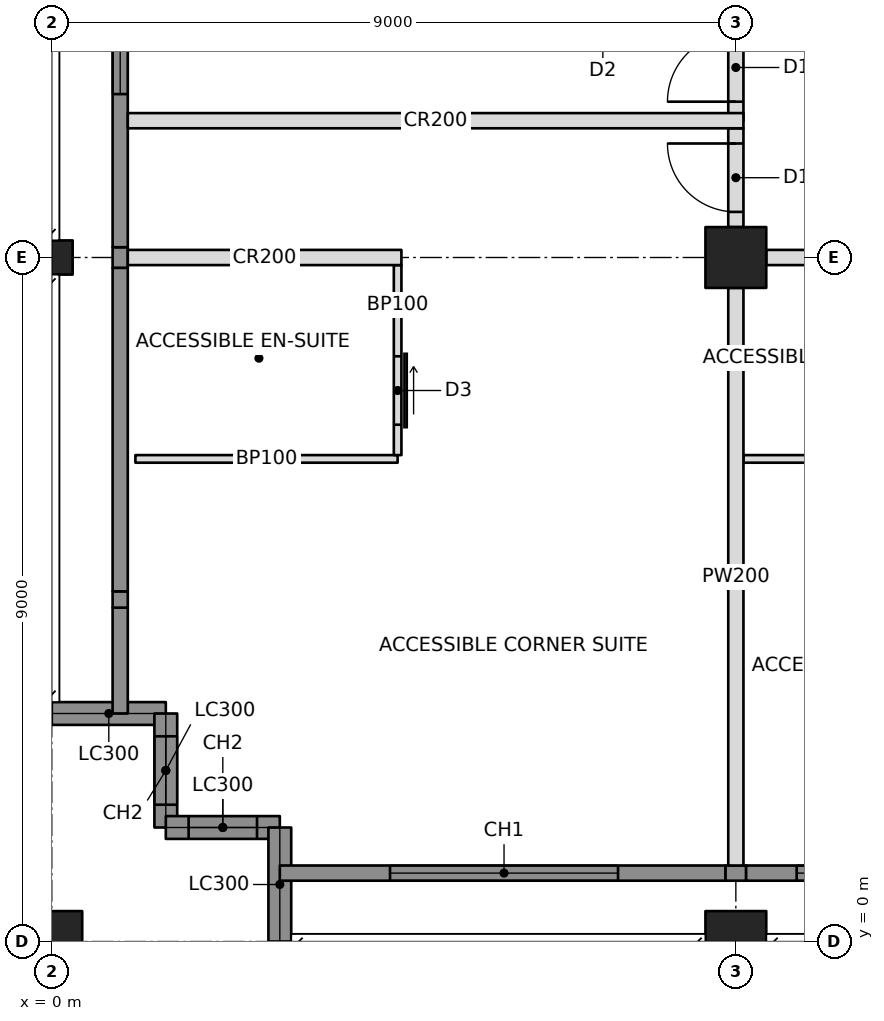
"""IFC4 building model, lengths in metres.
Left out: names, types, materials, properties, quantities, classifications, styles, units other than length and angle.
Written with IfcOpenShell. Run it as: python <this file> out.ifc"""

import sys

from ifc_helpers import new_model, si_unit, direction, frame, frame_2d, origin, origin_with_axes, origin_2d, place, context, subcontext, project, spatial, rectangle, hollow_rectangle, i_section, extrude, element, fill, save


model = new_model("IFC4")
c1 = context("Model", 3, precision=1e-05, world=origin(), true_north=direction((0.0, 1.0)))
c2 = subcontext(c1, "Body", "Model", "MODEL_VIEW")
j1 = project(units=[si_unit("LENGTHUNIT", "METRE"), si_unit("PLANEANGLEUNIT", "RADIAN")], contexts=[c1])
p1 = place(None, origin())
s1 = spatial("IfcSite", under=j1, at=p1, CompositionType="ELEMENT")
p2 = place(p1, origin())
s2 = spatial("IfcBuilding", under=s1, at=p2, CompositionType="ELEMENT")
p3 = place(p2, frame((0.0, 0.0, 170.6)))
s3 = spatial("IfcBuildingStorey", under=s2, at=p3, CompositionType="ELEMENT", Elevation=170.6)
p4 = place(p3, origin_with_axes())
e1 = element("IfcColumn", 1, at=p4, inside=s3, PredefinedType="COLUMN", context=c2, shape_type="SweptSolid", body=[
    extrude(hollow_rectangle(XDim=0.8, YDim=0.8, WallThickness=0.07, at=origin_2d()), origin(), (0.0, 0.0, 1.0), 3.4),
])
p5 = place(p3, frame((0.0, 9.0, 0.0), z_axis=(0.0, 0.0, 1.0), x_axis=(0.0, 1.0, 0.0)))
e2 = element("IfcColumn", 2, at=p5, inside=s3, PredefinedType="COLUMN", context=c2, shape_type="SweptSolid", body=[
    extrude(i_section(OverallWidth=0.449, OverallDepth=0.549, WebThickness=0.072, FlangeThickness=0.115, at=origin_2d()), origin(), (0.0, 0.0, 1.0), 3.4),
])
p6 = place(p3, frame((9.0, 0.0, 0.0), z_axis=(0.0, 0.0, 1.0), x_axis=(1.0, 0.0, 0.0)))
e3 = element("IfcColumn", 3, at=p6, inside=s3, PredefinedType="COLUMN", context=c2, shape_type="SweptSolid", body=[
    extrude(hollow_rectangle(XDim=0.8, YDim=0.8, WallThickness=0.07, at=origin_2d()), origin(), (0.0, 0.0, 1.0), 3.4),
])
p7 = place(p3, frame((9.0, 9.0, 0.0), z_axis=(0.0, 0.0, 1.0), x_axis=(1.0, 0.0, 0.0)))
e4 = element("IfcColumn", 4, at=p7, inside=s3, PredefinedType="COLUMN", context=c2, shape_type="SweptSolid", body=[
    extrude(hollow_rectangle(XDim=0.8, YDim=0.8, WallThickness=0.06, at=origin_2d()), origin(), (0.0, 0.0, 1.0), 3.4),
])
p8 = place(p3, frame((0.0, 3.0, 0.0), z_axis=(0.0, 0.0, 1.0), x_axis=(1.0, 0.0, 0.0)))
e5 = element("IfcWall", 5, at=p8, inside=s3, PredefinedType="SOLIDWALL", context=c2, shape_type="SweptSolid", body=[
    extrude(rectangle(XDim=1.5, YDim=0.3, at=frame_2d((0.75, 0.0))), origin(), (0.0, 0.0, 1.0), 2.42),
])
p9 = place(p3, frame((1.5, 3.0, 0.0), z_axis=(0.0, 0.0, 1.0), x_axis=(0.0, -1.0, 0.0)))
e6 = element("IfcWall", 6, at=p9, inside=s3, PredefinedType="SOLIDWALL", context=c2, shape_type="SweptSolid", body=[
    extrude(rectangle(XDim=1.5, YDim=0.3, at=frame_2d((0.75, 0.0))), origin(), (0.0, 0.0, 1.0), 3.2),
])
p10 = place(p9, frame((0.3, 0.0, 0.6)))
e7 = element("IfcOpeningElement", 7, at=p10, cuts=e6, PredefinedType="OPENING", context=c2, shape_type="SweptSolid", body=[
    extrude(rectangle(XDim=0.9, YDim=2.2, at=frame_2d((0.45, 1.1))), frame((0.0, 0.16, 0.0), z_axis=(0.0, -1.0, 0.0), x_axis=(1.0, 0.0, 0.0)), (0.0, 0.0, 1.0), 0.32),
])
p11 = place(p3, frame((1.5, 1.5, 0.0), z_axis=(0.0, 0.0, 1.0), x_axis=(1.0, 0.0, 0.0)))
e8 = element("IfcWall", 8, at=p11, inside=s3, PredefinedType="SOLIDWALL", context=c2, shape_type="SweptSolid", body=[
    extrude(rectangle(XDim=1.5, YDim=0.3, at=frame_2d((0.75, 0.0))), origin(), (0.0, 0.0, 1.0), 3.2),
])
p12 = place(p11, frame((0.3, 0.0, 0.6)))
e9 = element("IfcOpeningElement", 9, at=p12, cuts=e8, PredefinedType="OPENING", context=c2, shape_type="SweptSolid", body=[
    extrude(rectangle(XDim=0.9, YDim=2.2, at=frame_2d((0.45, 1.1))), frame((0.0, 0.16, 0.0), z_axis=(0.0, -1.0, 0.0), x_axis=(1.0, 0.0, 0.0)), (0.0, 0.0, 1.0), 0.32),
])
p13 = place(p3, frame((3.0, 1.5, 0.0), z_axis=(0.0, 0.0, 1.0), x_axis=(0.0, -1.0, 0.0)))
e10 = element("IfcWall", 10, at=p13, inside=s3, PredefinedType="SOLIDWALL", context=c2, shape_type="SweptSolid", body=[
    extrude(rectangle(XDim=1.5, YDim=0.3, at=frame_2d((0.75, 0.0))), origin(), (0.0, 0.0, 1.0), 2.42),
])
p14 = place(p3, frame((3.0, 0.9, 0.0), z_axis=(0.0, 0.0, 1.0), x_axis=(1.0, 0.0, 0.0)))
e11 = element("IfcWall", 11, at=p14, inside=s3, PredefinedType="SOLIDWALL", context=c2, shape_type="SweptSolid", body=[
    extrude(rectangle(XDim=5.865, YDim=0.2, at=frame_2d((2.932, 0.0))), origin(), (0.0, 0.0, 1.0), 3.2),
])
p15 = place(p14, frame((1.45, 0.0, 0.6)))
e12 = element("IfcOpeningElement", 12, at=p15, cuts=e11, PredefinedType="OPENING", context=c2, shape_type="SweptSolid", body=[
    extrude(rectangle(XDim=3.0, YDim=2.2, at=frame_2d((1.5, 1.1))), frame((0.0, 0.11, 0.0), z_axis=(0.0, -1.0, 0.0), x_axis=(1.0, 0.0, 0.0)), (0.0, 0.0, 1.0), 0.22),
])
p16 = place(p3, frame((0.9, 3.0, 0.0), z_axis=(0.0, 0.0, 1.0), x_axis=(0.0, 1.0, 0.0)))
e13 = element("IfcWall", 13, at=p16, inside=s3, PredefinedType="SOLIDWALL", context=c2, shape_type="SweptSolid", body=[
    extrude(rectangle(XDim=1.393, YDim=0.2, at=frame_2d((0.696, 0.0))), origin(), (0.0, 0.0, 1.0), 3.2),
])
p17 = place(p3, frame((1.0, 9.0, 0.0), z_axis=(0.0, 0.0, 1.0), x_axis=(1.0, 0.0, 0.0)))
e14 = element("IfcWall", 14, at=p17, inside=s3, PredefinedType="PARTITIONING", context=c2, shape_type="SweptSolid", body=[
    extrude(rectangle(XDim=3.6, YDim=0.2, at=frame_2d((1.8, 0.0))), origin(), (0.0, 0.0, 1.0), 2.438),
])
p18 = place(p3, frame((9.4, 9.0, 0.0), z_axis=(0.0, 0.0, 1.0), x_axis=(1.0, 0.0, 0.0)))
e15 = element("IfcWall", 15, at=p18, inside=s3, PredefinedType="PARTITIONING", context=c2, shape_type="SweptSolid", body=[
    extrude(rectangle(XDim=8.2, YDim=0.2, at=frame_2d((4.1, 0.0))), origin(), (0.0, 0.0, 1.0), 2.405),
])
p19 = place(p18, frame((2.95, 0.0, 0.0)))
e16 = element("IfcOpeningElement", 16, at=p19, cuts=e15, PredefinedType="OPENING", context=c2, shape_type="SweptSolid", body=[
    extrude(rectangle(XDim=0.9, YDim=2.1, at=frame_2d((0.45, 1.05))), frame((0.0, 0.11, 0.0), z_axis=(0.0, -1.0, 0.0), x_axis=(1.0, 0.0, 0.0)), (0.0, 0.0, 1.0), 0.22),
])
p20 = place(p18, frame((4.35, 0.0, 0.0)))
e17 = element("IfcOpeningElement", 17, at=p20, cuts=e15, PredefinedType="OPENING", context=c2, shape_type="SweptSolid", body=[
    extrude(rectangle(XDim=0.9, YDim=2.1, at=frame_2d((0.45, 1.05))), frame((0.0, 0.11, 0.0), z_axis=(0.0, -1.0, 0.0), x_axis=(1.0, 0.0, 0.0)), (0.0, 0.0, 1.0), 0.22),
])
p21 = place(p3, frame((9.0, 10.8, 0.0), z_axis=(0.0, 0.0, 1.0), x_axis=(0.0, 1.0, 0.0)))
e18 = element("IfcWall", 18, at=p21, inside=s3, PredefinedType="PARTITIONING", context=c2, shape_type="SweptSolid", body=[
    extrude(rectangle(XDim=6.8, YDim=0.2, at=frame_2d((3.4, 0.0))), origin(), (0.0, 0.0, 1.0), 2.405),
])
p22 = place(p21, frame((0.25, 0.0, 0.0)))
e19 = element("IfcOpeningElement", 19, at=p22, cuts=e18, PredefinedType="OPENING", context=c2, shape_type="SweptSolid", body=[
    extrude(rectangle(XDim=0.9, YDim=2.1, at=frame_2d((0.45, 1.05))), frame((0.0, 0.11, 0.0), z_axis=(0.0, -1.0, 0.0), x_axis=(1.0, 0.0, 0.0)), (0.0, 0.0, 1.0), 0.22),
])
p23 = place(p21, frame((3.85, 0.0, 0.0)))
e20 = element("IfcOpeningElement", 20, at=p23, cuts=e18, PredefinedType="OPENING", context=c2, shape_type="SweptSolid", body=[
    extrude(rectangle(XDim=0.9, YDim=2.1, at=frame_2d((0.45, 1.05))), frame((0.0, 0.11, 0.0), z_axis=(0.0, -1.0, 0.0), x_axis=(1.0, 0.0, 0.0)), (0.0, 0.0, 1.0), 0.22),
])
p24 = place(p3, frame((1.0, 10.8, 0.0), z_axis=(0.0, 0.0, 1.0), x_axis=(1.0, 0.0, 0.0)))
e21 = element("IfcWall", 21, at=p24, inside=s3, PredefinedType="PARTITIONING", context=c2, shape_type="SweptSolid", body=[
    extrude(rectangle(XDim=8.1, YDim=0.2, at=frame_2d((4.05, 0.0))), origin(), (0.0, 0.0, 1.0), 2.404),
])
p25 = place(p3, frame((9.0, 8.6, 0.0), z_axis=(0.0, 0.0, 1.0), x_axis=(0.0, -1.0, 0.0)))
e22 = element("IfcWall", 22, at=p25, inside=s3, PredefinedType="PARTITIONING", context=c2, shape_type="SweptSolid", body=[
    extrude(rectangle(XDim=7.6, YDim=0.2, at=frame_2d((3.8, 0.0))), origin(), (0.0, 0.0, 1.0), 2.438),
])
p26 = place(p3, frame((1.1, 6.35, 0.0), z_axis=(0.0, 0.0, 1.0), x_axis=(1.0, 0.0, 0.0)))
e23 = element("IfcWall", 23, at=p26, inside=s3, PredefinedType="PARTITIONING", context=c2, shape_type="SweptSolid", body=[
    extrude(rectangle(XDim=3.45, YDim=0.1, at=frame_2d((1.725, 0.0))), origin(), (0.0, 0.0, 1.0), 3.2),
])
p27 = place(p3, frame((4.55, 8.9, 0.0), z_axis=(0.0, 0.0, 1.0), x_axis=(0.0, -1.0, 0.0)))
e24 = element("IfcWall", 24, at=p27, inside=s3, PredefinedType="PARTITIONING", context=c2, shape_type="SweptSolid", body=[
    extrude(rectangle(XDim=2.5, YDim=0.1, at=frame_2d((1.25, 0.0))), origin(), (0.0, 0.0, 1.0), 2.438),
])
p28 = place(p27, frame((1.2, 0.0, 0.0)))
e25 = element("IfcOpeningElement", 25, at=p28, cuts=e24, PredefinedType="OPENING", context=c2, shape_type="SweptSolid", body=[
    extrude(rectangle(XDim=0.9, YDim=2.1, at=frame_2d((0.45, 1.05))), frame((0.0, 0.06, 0.0), z_axis=(0.0, -1.0, 0.0), x_axis=(1.0, 0.0, 0.0)), (0.0, 0.0, 1.0), 0.12),
])
p29 = place(p3, frame((9.1, 6.35, 0.0), z_axis=(0.0, 0.0, 1.0), x_axis=(1.0, 0.0, 0.0)))
e26 = element("IfcWall", 26, at=p29, inside=s3, PredefinedType="PARTITIONING", context=c2, shape_type="SweptSolid", body=[
    extrude(rectangle(XDim=2.95, YDim=0.1, at=frame_2d((1.475, 0.0))), origin(), (0.0, 0.0, 1.0), 2.438),
])
p30 = place(p3, frame((9.0, 9.4, 0.0), z_axis=(0.0, 0.0, 1.0), x_axis=(0.0, 1.0, 0.0)))
e27 = element("IfcWall", 27, at=p30, inside=s3, PredefinedType="PARTITIONING", context=c2, shape_type="SweptSolid", body=[
    extrude(rectangle(XDim=1.3, YDim=0.2, at=frame_2d((0.65, 0.0))), origin(), (0.0, 0.0, 1.0), 2.405),
])
p31 = place(p30, frame((0.2, 0.0, 0.0)))
e28 = element("IfcOpeningElement", 28, at=p31, cuts=e27, PredefinedType="OPENING", context=c2, shape_type="SweptSolid", body=[
    extrude(rectangle(XDim=0.9, YDim=2.1, at=frame_2d((0.45, 1.05))), frame((0.0, 0.11, 0.0), z_axis=(0.0, -1.0, 0.0), x_axis=(1.0, 0.0, 0.0)), (0.0, 0.0, 1.0), 0.22),
])
p32 = place(p3, frame((8.865, 0.9, 0.0), z_axis=(0.0, 0.0, 1.0), x_axis=(1.0, 0.0, 0.0)))
e29 = element("IfcWall", 29, at=p32, inside=s3, PredefinedType="SOLIDWALL", context=c2, shape_type="SweptSolid", body=[
    extrude(rectangle(XDim=0.271, YDim=0.2, at=frame_2d((0.135, 0.0))), origin(), (0.0, 0.0, 1.0), 2.438),
])
p33 = place(p3, frame((9.135, 0.9, 0.0), z_axis=(0.0, 0.0, 1.0), x_axis=(1.0, 0.0, 0.0)))
e30 = element("IfcWall", 30, at=p33, inside=s3, PredefinedType="SOLIDWALL", context=c2, shape_type="SweptSolid", body=[
    extrude(rectangle(XDim=8.671, YDim=0.2, at=frame_2d((4.335, 0.0))), origin(), (0.0, 0.0, 1.0), 3.2),
])
p34 = place(p33, frame((0.665, 0.0, 0.6)))
e31 = element("IfcOpeningElement", 31, at=p34, cuts=e30, PredefinedType="OPENING", context=c2, shape_type="SweptSolid", body=[
    extrude(rectangle(XDim=3.0, YDim=2.2, at=frame_2d((1.5, 1.1))), frame((0.0, 0.11, 0.0), z_axis=(0.0, -1.0, 0.0), x_axis=(1.0, 0.0, 0.0)), (0.0, 0.0, 1.0), 0.22),
])
p35 = place(p33, frame((5.065, 0.0, 0.6)))
e32 = element("IfcOpeningElement", 32, at=p35, cuts=e30, PredefinedType="OPENING", context=c2, shape_type="SweptSolid", body=[
    extrude(rectangle(XDim=3.0, YDim=2.2, at=frame_2d((1.5, 1.1))), frame((0.0, 0.11, 0.0), z_axis=(0.0, -1.0, 0.0), x_axis=(1.0, 0.0, 0.0)), (0.0, 0.0, 1.0), 0.22),
])
p36 = place(p3, frame((0.9, 4.393, 0.0), z_axis=(0.0, 0.0, 1.0), x_axis=(0.0, 1.0, 0.0)))
e33 = element("IfcWall", 33, at=p36, inside=s3, PredefinedType="SOLIDWALL", context=c2, shape_type="SweptSolid", body=[
    extrude(rectangle(XDim=0.215, YDim=0.2, at=frame_2d((0.107, 0.0))), origin(), (0.0, 0.0, 1.0), 2.661),
])
p37 = place(p3, frame((0.9, 4.607, 0.0), z_axis=(0.0, 0.0, 1.0), x_axis=(0.0, 1.0, 0.0)))
e34 = element("IfcWall", 34, at=p37, inside=s3, PredefinedType="SOLIDWALL", context=c2, shape_type="SweptSolid", body=[
    extrude(rectangle(XDim=4.257, YDim=0.2, at=frame_2d((2.129, 0.0))), origin(), (0.0, 0.0, 1.0), 3.2),
])
p38 = place(p3, frame((0.9, 8.865, 0.0), z_axis=(0.0, 0.0, 1.0), x_axis=(0.0, 1.0, 0.0)))
e35 = element("IfcWall", 35, at=p38, inside=s3, PredefinedType="SOLIDWALL", context=c2, shape_type="SweptSolid", body=[
    extrude(rectangle(XDim=0.271, YDim=0.2, at=frame_2d((0.135, 0.0))), origin(), (0.0, 0.0, 1.0), 2.438),
])
p39 = place(p3, frame((0.9, 9.135, 0.0), z_axis=(0.0, 0.0, 1.0), x_axis=(0.0, 1.0, 0.0)))
e36 = element("IfcWall", 36, at=p39, inside=s3, PredefinedType="SOLIDWALL", context=c2, shape_type="SweptSolid", body=[
    extrude(rectangle(XDim=8.671, YDim=0.2, at=frame_2d((4.335, 0.0))), origin(), (0.0, 0.0, 1.0), 3.2),
])
p40 = place(p39, frame((2.015, 0.0, 0.6)))
e37 = element("IfcOpeningElement", 37, at=p40, cuts=e36, PredefinedType="OPENING", context=c2, shape_type="SweptSolid", body=[
    extrude(rectangle(XDim=3.0, YDim=2.2, at=frame_2d((1.5, 1.1))), frame((0.0, 0.11, 0.0), z_axis=(0.0, -1.0, 0.0), x_axis=(1.0, 0.0, 0.0)), (0.0, 0.0, 1.0), 0.22),
])
p41 = place(p39, frame((5.515, 0.0, 0.6)))
e38 = element("IfcOpeningElement", 38, at=p41, cuts=e36, PredefinedType="OPENING", context=c2, shape_type="SweptSolid", body=[
    extrude(rectangle(XDim=3.0, YDim=2.2, at=frame_2d((1.5, 1.1))), frame((0.0, 0.11, 0.0), z_axis=(0.0, -1.0, 0.0), x_axis=(1.0, 0.0, 0.0)), (0.0, 0.0, 1.0), 0.22),
])
p42 = place(p10, origin())
e39 = element("IfcWindow", 39, at=p42, inside=s3, PartitioningType="SINGLE_PANEL", PredefinedType="WINDOW", context=c2, shape_type="SweptSolid", body=[
    extrude(rectangle(XDim=0.9, YDim=2.2, at=frame_2d((0.45, 1.1))), frame((0.0, 0.03, 0.0), z_axis=(0.0, -1.0, 0.0), x_axis=(1.0, 0.0, 0.0)), (0.0, 0.0, 1.0), 0.06),
])
fill(e7, e39)
p43 = place(p12, origin())
e40 = element("IfcWindow", 40, at=p43, inside=s3, PartitioningType="SINGLE_PANEL", PredefinedType="WINDOW", context=c2, shape_type="SweptSolid", body=[
    extrude(rectangle(XDim=0.9, YDim=2.2, at=frame_2d((0.45, 1.1))), frame((0.0, 0.03, 0.0), z_axis=(0.0, -1.0, 0.0), x_axis=(1.0, 0.0, 0.0)), (0.0, 0.0, 1.0), 0.06),
])
fill(e9, e40)
p44 = place(p15, origin())
e41 = element("IfcWindow", 41, at=p44, inside=s3, PartitioningType="TRIPLE_PANEL_VERTICAL", PredefinedType="WINDOW", context=c2, shape_type="SweptSolid", body=[
    extrude(rectangle(XDim=3.0, YDim=2.2, at=frame_2d((1.5, 1.1))), frame((0.0, 0.03, 0.0), z_axis=(0.0, -1.0, 0.0), x_axis=(1.0, 0.0, 0.0)), (0.0, 0.0, 1.0), 0.06),
])
fill(e12, e41)
p45 = place(p34, origin())
e42 = element("IfcWindow", 42, at=p45, inside=s3, PartitioningType="TRIPLE_PANEL_VERTICAL", PredefinedType="WINDOW", context=c2, shape_type="SweptSolid", body=[
    extrude(rectangle(XDim=3.0, YDim=2.2, at=frame_2d((1.5, 1.1))), frame((0.0, 0.03, 0.0), z_axis=(0.0, -1.0, 0.0), x_axis=(1.0, 0.0, 0.0)), (0.0, 0.0, 1.0), 0.06),
])
fill(e31, e42)
p46 = place(p40, origin())
e43 = element("IfcWindow", 43, at=p46, inside=s3, PartitioningType="TRIPLE_PANEL_VERTICAL", PredefinedType="WINDOW", context=c2, shape_type="SweptSolid", body=[
    extrude(rectangle(XDim=3.0, YDim=2.2, at=frame_2d((1.5, 1.1))), frame((0.0, 0.03, 0.0), z_axis=(0.0, -1.0, 0.0), x_axis=(1.0, 0.0, 0.0)), (0.0, 0.0, 1.0), 0.06),
])
fill(e37, e43)
p47 = place(p28, origin())
e44 = element("IfcDoor", 44, at=p47, inside=s3, OperationType="SLIDING_TO_LEFT", PredefinedType="DOOR", context=c2, shape_type="SweptSolid", body=[
    extrude(rectangle(XDim=0.9, YDim=2.1, at=frame_2d((0.45, 1.05))), frame((0.0, 0.025, 0.0), z_axis=(0.0, -1.0, 0.0), x_axis=(1.0, 0.0, 0.0)), (0.0, 0.0, 1.0), 0.05),
])
fill(e25, e44)
p48 = place(p22, origin())
e45 = element("IfcDoor", 45, at=p48, inside=s3, OperationType="SINGLE_SWING_LEFT", PredefinedType="DOOR", context=c2, shape_type="SweptSolid", body=[
    extrude(rectangle(XDim=0.9, YDim=2.1, at=frame_2d((0.45, 1.05))), frame((0.0, 0.025, 0.0), z_axis=(0.0, -1.0, 0.0), x_axis=(1.0, 0.0, 0.0)), (0.0, 0.0, 1.0), 0.05),
])
fill(e19, e45)
p49 = place(p31, origin())
e46 = element("IfcDoor", 46, at=p49, inside=s3, OperationType="SINGLE_SWING_RIGHT", PredefinedType="DOOR", context=c2, shape_type="SweptSolid", body=[
    extrude(rectangle(XDim=0.9, YDim=2.1, at=frame_2d((0.45, 1.05))), frame((0.0, 0.025, 0.0), z_axis=(0.0, -1.0, 0.0), x_axis=(1.0, 0.0, 0.0)), (0.0, 0.0, 1.0), 0.05),
])
fill(e28, e46)
save(model, sys.argv[1])
